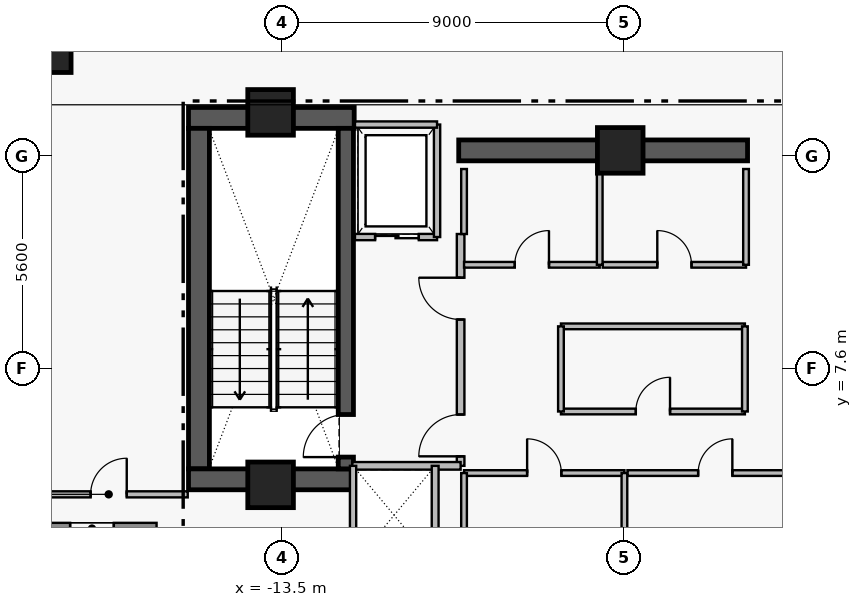
"""IFC4 building model, lengths in metres.
Left out: names, types, materials, properties, quantities, classifications, styles, units other than length and angle.
Written with IfcOpenShell. Run it as: python <this file> out.ifc"""

import sys

from ifc_helpers import new_model, si_unit, direction, frame, frame_2d, origin, origin_2d, place, context, subcontext, project, spatial, rectangle, extrude, element, fill, save


model = new_model("IFC4")
c1 = context("Model", 3, precision=1e-05, world=origin(), true_north=direction((0.0, 1.0)))
c2 = subcontext(c1, "Body", "Model", "MODEL_VIEW")
j1 = project(units=[si_unit("LENGTHUNIT", "METRE"), si_unit("PLANEANGLEUNIT", "RADIAN")], contexts=[c1])
p1 = place(None, origin())
s1 = spatial("IfcSite", under=j1, at=p1, CompositionType="ELEMENT")
p2 = place(p1, origin())
s2 = spatial("IfcBuilding", under=s1, at=p2, CompositionType="ELEMENT")
p3 = place(p2, frame((0.0, 0.0, 254.45)))
s3 = spatial("IfcBuildingStorey", under=s2, at=p3, CompositionType="ELEMENT", Elevation=254.45)
p4 = place(p3, frame((-15.96, 14.205, 0.0), z_axis=(0.0, 0.0, 1.0), x_axis=(1.0, 0.0, 0.0)))
e1 = element("IfcWall", 1, at=p4, inside=s3, PredefinedType="SHEAR", context=c2, shape_type="SweptSolid", body=[
    extrude(rectangle(XDim=4.36, YDim=0.55, at=frame_2d((2.18, 0.0))), origin(), (0.0, 0.0, 1.0), 3.51),
])
p5 = place(p3, frame((-15.685, 4.97, 0.0), z_axis=(0.0, 0.0, 1.0), x_axis=(0.0, 1.0, 0.0)))
e2 = element("IfcWall", 2, at=p5, inside=s3, PredefinedType="SHEAR", context=c2, shape_type="SweptSolid", body=[
    extrude(rectangle(XDim=8.96, YDim=0.55, at=frame_2d((4.48, 0.0))), origin(), (0.0, 0.0, 1.0), 3.51),
])
p6 = place(p3, frame((-15.96, 4.695, 0.0), z_axis=(0.0, 0.0, 1.0), x_axis=(1.0, 0.0, 0.0)))
e3 = element("IfcWall", 3, at=p6, inside=s3, PredefinedType="SHEAR", context=c2, shape_type="SweptSolid", body=[
    extrude(rectangle(XDim=4.36, YDim=0.55, at=frame_2d((2.18, 0.0))), origin(), (0.0, 0.0, 1.0), 3.51),
])
p7 = place(p3, frame((-8.85, 13.35, 0.0), z_axis=(0.0, 0.0, 1.0), x_axis=(1.0, 0.0, 0.0)))
e4 = element("IfcWall", 4, at=p7, inside=s3, PredefinedType="SHEAR", context=c2, shape_type="SweptSolid", body=[
    extrude(rectangle(XDim=7.6, YDim=0.55, at=frame_2d((3.8, 0.0))), origin(), (0.0, 0.0, 1.0), 3.48),
])
p8 = place(p3, frame((-11.82, 4.97, 0.0), z_axis=(0.0, 0.0, 1.0), x_axis=(0.0, 1.0, 0.0)))
e5 = element("IfcWall", 5, at=p8, inside=s3, PredefinedType="SHEAR", context=c2, shape_type="SweptSolid", body=[
    extrude(rectangle(XDim=8.96, YDim=0.4, at=frame_2d((4.48, 0.0))), origin(), (0.0, 0.0, 1.0), 3.51),
])
p9 = place(p8, frame((0.31, 0.0, 0.0)))
e6 = element("IfcOpeningElement", 6, at=p9, cuts=e5, PredefinedType="OPENING", context=c2, shape_type="SweptSolid", body=[
    extrude(rectangle(XDim=1.12, YDim=2.22, at=frame_2d((0.56, 1.11))), frame((0.0, 0.21, 0.0), z_axis=(0.0, -1.0, 0.0), x_axis=(1.0, 0.0, 0.0)), (0.0, 0.0, 1.0), 0.42),
])
for number, where, z_axis, x_axis in (
    (7, (-13.8, 14.35, 0.0), (0.0, 0.0, 1.0), (1.0, 0.0, 0.0)),
    (8, (-4.6, 13.35, 0.0), (0.0, 0.0, 1.0), (1.0, 0.0, 0.0)),
    (9, (-13.8, 4.55, 0.0), (0.0, 0.0, 1.0), (1.0, 0.0, 0.0)),
):
    element("IfcColumn", number, at=place(p3, frame(where, z_axis=z_axis, x_axis=x_axis)), inside=s3, PredefinedType="COLUMN", context=c2, shape_type="SweptSolid", body=[
        extrude(rectangle(XDim=1.2, YDim=1.2, at=origin_2d()), origin(), (0.0, 0.0, 1.0), 3.7),
    ])
p10 = place(p3, frame((-19.55, 15.9, 0.0), z_axis=(0.0, 0.0, 1.0), x_axis=(1.0, 0.0, 0.0)))
e10 = element("IfcColumn", 10, at=p10, inside=s3, PredefinedType="COLUMN", context=c2, shape_type="SweptSolid", body=[
    extrude(rectangle(XDim=1.0, YDim=1.0, at=origin_2d()), origin(), (0.0, 0.0, 1.0), 3.7),
])
p11 = place(p3, frame((-16.8, 3.4, 0.0), z_axis=(0.0, 0.0, 1.0), x_axis=(-1.0, 0.0, 0.0)))
e11 = element("IfcWall", 11, at=p11, inside=s3, PredefinedType="STANDARD", context=c2, shape_type="SweptSolid", body=[
    extrude(rectangle(XDim=3.4, YDim=0.3, at=frame_2d((1.7, 0.0))), origin(), (0.0, 0.0, 1.0), 3.48),
])
p12 = place(p11, frame((1.125, 0.0, 1.25)))
e12 = element("IfcOpeningElement", 12, at=p12, cuts=e11, PredefinedType="OPENING", context=c2, shape_type="SweptSolid", body=[
    extrude(rectangle(XDim=1.15, YDim=1.55, at=frame_2d((0.575, 0.775))), frame((0.0, 0.16, 0.0), z_axis=(0.0, -1.0, 0.0), x_axis=(1.0, 0.0, 0.0)), (0.0, 0.0, 1.0), 0.32),
])
p13 = place(p3, frame((-8.8, 5.05, 0.0), z_axis=(0.0, 0.0, 1.0), x_axis=(0.0, 1.0, 0.0)))
e13 = element("IfcWall", 13, at=p13, inside=s3, PredefinedType="PARTITIONING", context=c2, shape_type="SweptSolid", body=[
    extrude(rectangle(XDim=6.1, YDim=0.2, at=frame_2d((3.05, 0.0))), origin(), (0.0, 0.0, 1.0), 3.48),
])
p14 = place(p13, frame((0.25, 0.0, 0.0)))
e14 = element("IfcOpeningElement", 14, at=p14, cuts=e13, PredefinedType="OPENING", context=c2, shape_type="SweptSolid", body=[
    extrude(rectangle(XDim=1.1, YDim=2.2, at=frame_2d((0.55, 1.1))), frame((0.0, 0.11, 0.0), z_axis=(0.0, -1.0, 0.0), x_axis=(1.0, 0.0, 0.0)), (0.0, 0.0, 1.0), 0.22),
])
p15 = place(p13, frame((3.85, 0.0, 0.0)))
e15 = element("IfcOpeningElement", 15, at=p15, cuts=e13, PredefinedType="OPENING", context=c2, shape_type="SweptSolid", body=[
    extrude(rectangle(XDim=1.1, YDim=2.2, at=frame_2d((0.55, 1.1))), frame((0.0, 0.11, 0.0), z_axis=(0.0, -1.0, 0.0), x_axis=(1.0, 0.0, 0.0)), (0.0, 0.0, 1.0), 0.22),
])
p16 = place(p3, frame((-11.58, 11.07, 0.0), z_axis=(0.0, 0.0, 1.0), x_axis=(1.0, 0.0, 0.0)))
e16 = element("IfcWall", 16, at=p16, inside=s3, PredefinedType="PARTITIONING", context=c2, shape_type="SweptSolid", body=[
    extrude(rectangle(XDim=2.16, YDim=0.165, at=frame_2d((1.08, 0.0))), origin(), (0.0, 0.0, 1.0), 3.48),
])
p17 = place(p16, frame((0.53, 0.0, 0.0)))
e17 = element("IfcOpeningElement", 17, at=p17, cuts=e16, PredefinedType="OPENING", context=c2, shape_type="SweptSolid", body=[
    extrude(rectangle(XDim=1.15, YDim=2.25, at=frame_2d((0.575, 1.125))), frame((0.0, 0.093, 0.0), z_axis=(0.0, -1.0, 0.0), x_axis=(1.0, 0.0, 0.0)), (0.0, 0.0, 1.0), 0.185),
])
p18 = place(p3, frame((-8.71, 4.86, 0.0), z_axis=(0.0, 0.0, 1.0), x_axis=(1.0, 0.0, 0.0)))
e18 = element("IfcWall", 18, at=p18, inside=s3, PredefinedType="PARTITIONING", context=c2, shape_type="SweptSolid", body=[
    extrude(rectangle(XDim=4.22, YDim=0.15, at=frame_2d((2.11, 0.0))), origin(), (0.0, 0.0, 1.0), 3.48),
])
p19 = place(p18, frame((1.66, 0.0, 0.0)))
e19 = element("IfcOpeningElement", 19, at=p19, cuts=e18, PredefinedType="OPENING", context=c2, shape_type="SweptSolid", body=[
    extrude(rectangle(XDim=0.9, YDim=2.15, at=frame_2d((0.45, 1.075))), frame((0.0, 0.085, 0.0), z_axis=(0.0, -1.0, 0.0), x_axis=(1.0, 0.0, 0.0)), (0.0, 0.0, 1.0), 0.17),
])
p20 = place(p3, frame((-4.41, 4.86, 0.0), z_axis=(0.0, 0.0, 1.0), x_axis=(1.0, 0.0, 0.0)))
e20 = element("IfcWall", 20, at=p20, inside=s3, PredefinedType="PARTITIONING", context=c2, shape_type="SweptSolid", body=[
    extrude(rectangle(XDim=4.62, YDim=0.15, at=frame_2d((2.31, 0.0))), origin(), (0.0, 0.0, 1.0), 3.48),
])
p21 = place(p20, frame((1.86, 0.0, 0.0)))
e21 = element("IfcOpeningElement", 21, at=p21, cuts=e20, PredefinedType="OPENING", context=c2, shape_type="SweptSolid", body=[
    extrude(rectangle(XDim=0.9, YDim=2.15, at=frame_2d((0.45, 1.075))), frame((0.0, 0.085, 0.0), z_axis=(0.0, -1.0, 0.0), x_axis=(1.0, 0.0, 0.0)), (0.0, 0.0, 1.0), 0.17),
])
p22 = place(p3, frame((-8.71, 10.34, 0.0), z_axis=(0.0, 0.0, 1.0), x_axis=(1.0, 0.0, 0.0)))
e22 = element("IfcWall", 22, at=p22, inside=s3, PredefinedType="PARTITIONING", context=c2, shape_type="SweptSolid", body=[
    extrude(rectangle(XDim=3.57, YDim=0.15, at=frame_2d((1.785, 0.0))), origin(), (0.0, 0.0, 1.0), 3.48),
])
p23 = place(p22, frame((1.335, 0.0, 0.0)))
e23 = element("IfcOpeningElement", 23, at=p23, cuts=e22, PredefinedType="OPENING", context=c2, shape_type="SweptSolid", body=[
    extrude(rectangle(XDim=0.9, YDim=2.15, at=frame_2d((0.45, 1.075))), frame((0.0, 0.085, 0.0), z_axis=(0.0, -1.0, 0.0), x_axis=(1.0, 0.0, 0.0)), (0.0, 0.0, 1.0), 0.17),
])
p24 = place(p3, frame((-5.06, 10.34, 0.0), z_axis=(0.0, 0.0, 1.0), x_axis=(1.0, 0.0, 0.0)))
e24 = element("IfcWall", 24, at=p24, inside=s3, PredefinedType="PARTITIONING", context=c2, shape_type="SweptSolid", body=[
    extrude(rectangle(XDim=3.77, YDim=0.15, at=frame_2d((1.885, 0.0))), origin(), (0.0, 0.0, 1.0), 3.48),
])
p25 = place(p24, frame((1.435, 0.0, 0.0)))
e25 = element("IfcOpeningElement", 25, at=p25, cuts=e24, PredefinedType="OPENING", context=c2, shape_type="SweptSolid", body=[
    extrude(rectangle(XDim=0.9, YDim=2.15, at=frame_2d((0.45, 1.075))), frame((0.0, 0.085, 0.0), z_axis=(0.0, -1.0, 0.0), x_axis=(1.0, 0.0, 0.0)), (0.0, 0.0, 1.0), 0.17),
])
p26 = place(p3, frame((-6.16, 6.48, 0.0), z_axis=(0.0, 0.0, 1.0), x_axis=(1.0, 0.0, 0.0)))
e26 = element("IfcWall", 26, at=p26, inside=s3, PredefinedType="PARTITIONING", context=c2, shape_type="SweptSolid", body=[
    extrude(rectangle(XDim=4.84, YDim=0.15, at=frame_2d((2.42, 0.0))), origin(), (0.0, 0.0, 1.0), 3.48),
])
p27 = place(p26, frame((1.97, 0.0, 0.0)))
e27 = element("IfcOpeningElement", 27, at=p27, cuts=e26, PredefinedType="OPENING", context=c2, shape_type="SweptSolid", body=[
    extrude(rectangle(XDim=0.9, YDim=2.15, at=frame_2d((0.45, 1.075))), frame((0.0, 0.085, 0.0), z_axis=(0.0, -1.0, 0.0), x_axis=(1.0, 0.0, 0.0)), (0.0, 0.0, 1.0), 0.17),
])
p28 = place(p3, frame((-20.14, 4.3, 0.0), z_axis=(0.0, 0.0, 1.0), x_axis=(1.0, 0.0, 0.0)))
e28 = element("IfcWall", 28, at=p28, inside=s3, PredefinedType="PARTITIONING", context=c2, shape_type="SweptSolid", body=[
    extrude(rectangle(XDim=4.16, YDim=0.16, at=frame_2d((2.08, 0.0))), origin(), (0.0, 0.0, 1.0), 3.48),
])
p29 = place(p28, frame((1.605, 0.0, 0.0)))
e29 = element("IfcOpeningElement", 29, at=p29, cuts=e28, PredefinedType="OPENING", context=c2, shape_type="SweptSolid", body=[
    extrude(rectangle(XDim=0.95, YDim=2.15, at=frame_2d((0.475, 1.075))), frame((0.0, 0.09, 0.0), z_axis=(0.0, -1.0, 0.0), x_axis=(1.0, 0.0, 0.0)), (0.0, 0.0, 1.0), 0.18),
])
p30 = place(p3, frame((-11.65, 5.05, 0.0), z_axis=(0.0, 0.0, 1.0), x_axis=(1.0, 0.0, 0.0)))
e30 = element("IfcWall", 30, at=p30, inside=s3, PredefinedType="PARTITIONING", context=c2, shape_type="SweptSolid", body=[
    extrude(rectangle(XDim=2.85, YDim=0.2, at=frame_2d((1.425, 0.0))), origin(), (0.0, 0.0, 1.0), 3.48),
])
p31 = place(p3, frame((-9.42, 11.07, 0.0), z_axis=(0.0, 0.0, 1.0), x_axis=(0.0, 1.0, 0.0)))
e31 = element("IfcWall", 31, at=p31, inside=s3, PredefinedType="PARTITIONING", context=c2, shape_type="SweptSolid", body=[
    extrude(rectangle(XDim=2.96, YDim=0.165, at=frame_2d((1.48, 0.0))), origin(), (0.0, 0.0, 1.0), 3.48),
])
p32 = place(p3, frame((-11.58, 14.03, 0.0), z_axis=(0.0, 0.0, 1.0), x_axis=(1.0, 0.0, 0.0)))
e32 = element("IfcWall", 32, at=p32, inside=s3, PredefinedType="PARTITIONING", context=c2, shape_type="SweptSolid", body=[
    extrude(rectangle(XDim=2.16, YDim=0.165, at=frame_2d((1.08, 0.0))), origin(), (0.0, 0.0, 1.0), 3.48),
])
for number, where, z_axis, x_axis in (
    (33, (-8.71, 2.49, 0.0), (0.0, 0.0, 1.0), (0.0, 1.0, 0.0)),
    (34, (-4.49, 2.49, 0.0), (0.0, 0.0, 1.0), (0.0, 1.0, 0.0)),
):
    element("IfcWall", number, at=place(p3, frame(where, z_axis=z_axis, x_axis=x_axis)), inside=s3, PredefinedType="PARTITIONING", context=c2, shape_type="SweptSolid", body=[
        extrude(rectangle(XDim=2.37, YDim=0.15, at=frame_2d((1.185, 0.0))), origin(), (0.0, 0.0, 1.0), 3.48),
    ])
p33 = place(p3, frame((-8.71, 11.15, 0.0), z_axis=(0.0, 0.0, 1.0), x_axis=(0.0, 1.0, 0.0)))
e35 = element("IfcWall", 35, at=p33, inside=s3, PredefinedType="PARTITIONING", context=c2, shape_type="SweptSolid", body=[
    extrude(rectangle(XDim=1.71, YDim=0.15, at=frame_2d((0.855, 0.0))), origin(), (0.0, 0.0, 1.0), 3.48),
])
for number, where, z_axis, x_axis in (
    (36, (-5.14, 10.34, 0.0), (0.0, 0.0, 1.0), (0.0, 1.0, 0.0)),
    (37, (-1.29, 10.34, 0.0), (0.0, 0.0, 1.0), (0.0, 1.0, 0.0)),
):
    element("IfcWall", number, at=place(p3, frame(where, z_axis=z_axis, x_axis=x_axis)), inside=s3, PredefinedType="PARTITIONING", context=c2, shape_type="SweptSolid", body=[
        extrude(rectangle(XDim=2.52, YDim=0.15, at=frame_2d((1.26, 0.0))), origin(), (0.0, 0.0, 1.0), 3.48),
    ])
p34 = place(p3, frame((-9.47, 2.45, 0.0), z_axis=(0.0, 0.0, 1.0), x_axis=(0.0, 1.0, 0.0)))
e38 = element("IfcWall", 38, at=p34, inside=s3, PredefinedType="PARTITIONING", context=c2, shape_type="SweptSolid", body=[
    extrude(rectangle(XDim=2.6, YDim=0.18, at=frame_2d((1.3, 0.0))), origin(), (0.0, 0.0, 1.0), 3.48),
])
p35 = place(p3, frame((-11.63, 2.47, 0.0), z_axis=(0.0, 0.0, 1.0), x_axis=(0.0, 1.0, 0.0)))
e39 = element("IfcWall", 39, at=p35, inside=s3, PredefinedType="PARTITIONING", context=c2, shape_type="SweptSolid", body=[
    extrude(rectangle(XDim=2.58, YDim=0.165, at=frame_2d((1.29, 0.0))), origin(), (0.0, 0.0, 1.0), 3.48),
])
p36 = place(p3, frame((-6.16, 8.72, 0.0), z_axis=(0.0, 0.0, 1.0), x_axis=(1.0, 0.0, 0.0)))
e40 = element("IfcWall", 40, at=p36, inside=s3, PredefinedType="PARTITIONING", context=c2, shape_type="SweptSolid", body=[
    extrude(rectangle(XDim=4.84, YDim=0.15, at=frame_2d((2.42, 0.0))), origin(), (0.0, 0.0, 1.0), 3.48),
])
for number, where, z_axis, x_axis in (
    (41, (-6.16, 6.48, 0.0), (0.0, 0.0, 1.0), (0.0, 1.0, 0.0)),
    (42, (-1.32, 6.48, 0.0), (0.0, 0.0, 1.0), (0.0, 1.0, 0.0)),
):
    element("IfcWall", number, at=place(p3, frame(where, z_axis=z_axis, x_axis=x_axis)), inside=s3, PredefinedType="PARTITIONING", context=c2, shape_type="SweptSolid", body=[
        extrude(rectangle(XDim=2.24, YDim=0.15, at=frame_2d((1.12, 0.0))), origin(), (0.0, 0.0, 1.0), 3.48),
    ])
p37 = place(p12, origin())
e43 = element("IfcWindow", 43, at=p37, inside=s3, PartitioningType="SINGLE_PANEL", PredefinedType="WINDOW", context=c2, shape_type="SweptSolid", body=[
    extrude(rectangle(XDim=1.15, YDim=1.55, at=frame_2d((0.575, 0.775))), frame((0.0, 0.03, 0.0), z_axis=(0.0, -1.0, 0.0), x_axis=(1.0, 0.0, 0.0)), (0.0, 0.0, 1.0), 0.06),
])
fill(e12, e43)
p38 = place(p9, origin())
e44 = element("IfcDoor", 44, at=p38, inside=s3, OperationType="SINGLE_SWING_LEFT", PredefinedType="DOOR", context=c2, shape_type="SweptSolid", body=[
    extrude(rectangle(XDim=1.12, YDim=2.22, at=frame_2d((0.56, 1.11))), frame((0.0, 0.025, 0.0), z_axis=(0.0, -1.0, 0.0), x_axis=(1.0, 0.0, 0.0)), (0.0, 0.0, 1.0), 0.05),
])
fill(e6, e44)
p39 = place(p14, origin())
e45 = element("IfcDoor", 45, at=p39, inside=s3, OperationType="SINGLE_SWING_LEFT", PredefinedType="DOOR", context=c2, shape_type="SweptSolid", body=[
    extrude(rectangle(XDim=1.1, YDim=2.2, at=frame_2d((0.55, 1.1))), frame((0.0, 0.025, 0.0), z_axis=(0.0, -1.0, 0.0), x_axis=(1.0, 0.0, 0.0)), (0.0, 0.0, 1.0), 0.05),
])
fill(e14, e45)
p40 = place(p15, origin())
e46 = element("IfcDoor", 46, at=p40, inside=s3, OperationType="SINGLE_SWING_RIGHT", PredefinedType="DOOR", context=c2, shape_type="SweptSolid", body=[
    extrude(rectangle(XDim=1.1, YDim=2.2, at=frame_2d((0.55, 1.1))), frame((0.0, 0.025, 0.0), z_axis=(0.0, -1.0, 0.0), x_axis=(1.0, 0.0, 0.0)), (0.0, 0.0, 1.0), 0.05),
])
fill(e15, e46)
p41 = place(p17, origin())
e47 = element("IfcDoor", 47, at=p41, inside=s3, OperationType="SLIDING_TO_LEFT", PredefinedType="DOOR", context=c2, shape_type="SweptSolid", body=[
    extrude(rectangle(XDim=1.15, YDim=2.25, at=frame_2d((0.575, 1.125))), frame((0.0, 0.025, 0.0), z_axis=(0.0, -1.0, 0.0), x_axis=(1.0, 0.0, 0.0)), (0.0, 0.0, 1.0), 0.05),
])
fill(e17, e47)
p42 = place(p19, origin())
e48 = element("IfcDoor", 48, at=p42, inside=s3, OperationType="SINGLE_SWING_LEFT", PredefinedType="DOOR", context=c2, shape_type="SweptSolid", body=[
    extrude(rectangle(XDim=0.9, YDim=2.15, at=frame_2d((0.45, 1.075))), frame((0.0, 0.025, 0.0), z_axis=(0.0, -1.0, 0.0), x_axis=(1.0, 0.0, 0.0)), (0.0, 0.0, 1.0), 0.05),
])
fill(e19, e48)
p43 = place(p21, origin())
e49 = element("IfcDoor", 49, at=p43, inside=s3, OperationType="SINGLE_SWING_RIGHT", PredefinedType="DOOR", context=c2, shape_type="SweptSolid", body=[
    extrude(rectangle(XDim=0.9, YDim=2.15, at=frame_2d((0.45, 1.075))), frame((0.0, 0.025, 0.0), z_axis=(0.0, -1.0, 0.0), x_axis=(1.0, 0.0, 0.0)), (0.0, 0.0, 1.0), 0.05),
])
fill(e21, e49)
p44 = place(p23, origin())
e50 = element("IfcDoor", 50, at=p44, inside=s3, OperationType="SINGLE_SWING_RIGHT", PredefinedType="DOOR", context=c2, shape_type="SweptSolid", body=[
    extrude(rectangle(XDim=0.9, YDim=2.15, at=frame_2d((0.45, 1.075))), frame((0.0, 0.025, 0.0), z_axis=(0.0, -1.0, 0.0), x_axis=(1.0, 0.0, 0.0)), (0.0, 0.0, 1.0), 0.05),
])
fill(e23, e50)
p45 = place(p25, origin())
e51 = element("IfcDoor", 51, at=p45, inside=s3, OperationType="SINGLE_SWING_LEFT", PredefinedType="DOOR", context=c2, shape_type="SweptSolid", body=[
    extrude(rectangle(XDim=0.9, YDim=2.15, at=frame_2d((0.45, 1.075))), frame((0.0, 0.025, 0.0), z_axis=(0.0, -1.0, 0.0), x_axis=(1.0, 0.0, 0.0)), (0.0, 0.0, 1.0), 0.05),
])
fill(e25, e51)
p46 = place(p27, origin())
e52 = element("IfcDoor", 52, at=p46, inside=s3, OperationType="SINGLE_SWING_RIGHT", PredefinedType="DOOR", context=c2, shape_type="SweptSolid", body=[
    extrude(rectangle(XDim=0.9, YDim=2.15, at=frame_2d((0.45, 1.075))), frame((0.0, 0.025, 0.0), z_axis=(0.0, -1.0, 0.0), x_axis=(1.0, 0.0, 0.0)), (0.0, 0.0, 1.0), 0.05),
])
fill(e27, e52)
p47 = place(p29, origin())
e53 = element("IfcDoor", 53, at=p47, inside=s3, OperationType="SINGLE_SWING_RIGHT", PredefinedType="DOOR", context=c2, shape_type="SweptSolid", body=[
    extrude(rectangle(XDim=0.95, YDim=2.15, at=frame_2d((0.475, 1.075))), frame((0.0, 0.025, 0.0), z_axis=(0.0, -1.0, 0.0), x_axis=(1.0, 0.0, 0.0)), (0.0, 0.0, 1.0), 0.05),
])
fill(e29, e53)
save(model, sys.argv[1])
